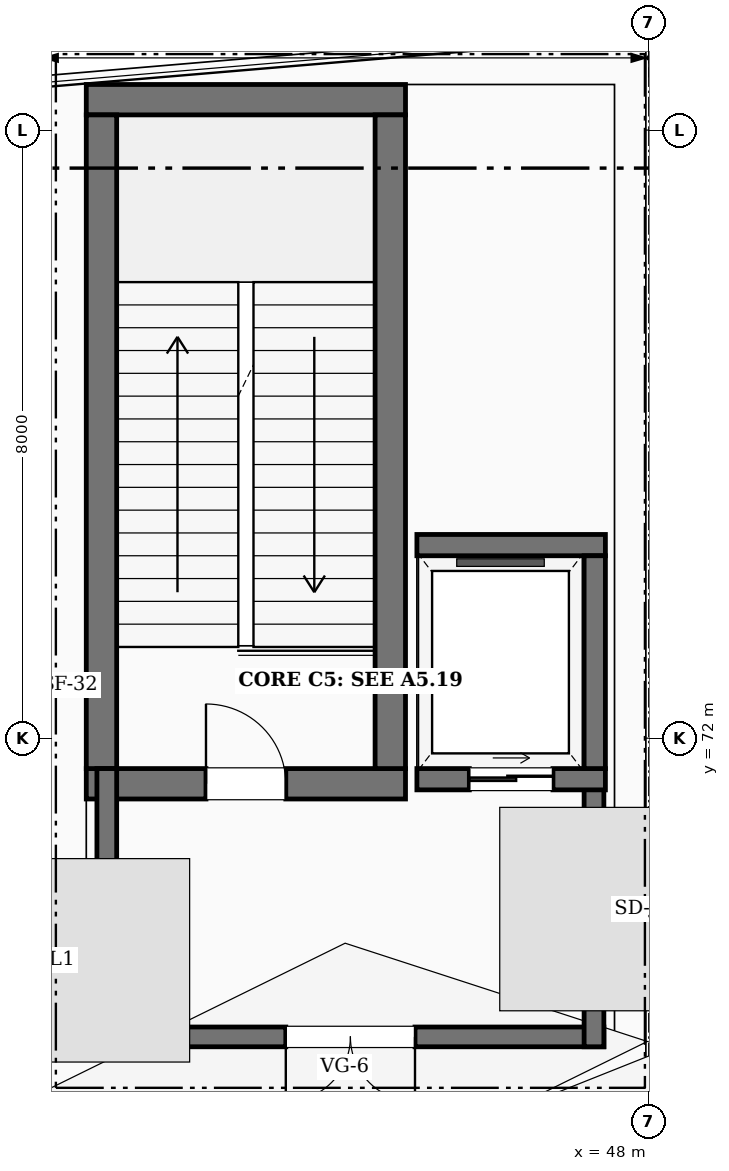
"""IFC4 building model, lengths in metres.
Left out: names, types, materials, properties, quantities, classifications, styles, units other than length and angle.
Written with IfcOpenShell. Run it as: python <this file> out.ifc"""

import sys

from ifc_helpers import new_model, si_unit, direction, frame, frame_2d, origin, place, context, subcontext, project, spatial, rectangle, extrude, element, fill, save


model = new_model("IFC4")
c1 = context("Model", 3, precision=1e-05, world=origin(), true_north=direction((0.0, 1.0)))
c2 = subcontext(c1, "Body", "Model", "MODEL_VIEW")
j1 = project(units=[si_unit("LENGTHUNIT", "METRE"), si_unit("PLANEANGLEUNIT", "RADIAN")], contexts=[c1])
p1 = place(None, origin())
s1 = spatial("IfcSite", under=j1, at=p1, CompositionType="ELEMENT")
p2 = place(p1, origin())
s2 = spatial("IfcBuilding", under=s1, at=p2, CompositionType="ELEMENT")
p3 = place(p2, frame((0.0, 0.0, 10.8)))
s3 = spatial("IfcBuildingStorey", under=s2, at=p3, CompositionType="ELEMENT", Elevation=10.8)
p4 = place(p3, frame((40.6, 71.4, 0.0), z_axis=(0.0, 0.0, 1.0), x_axis=(1.0, 0.0, 0.0)))
e1 = element("IfcWall", 1, at=p4, inside=s3, PredefinedType="SHEAR", context=c2, shape_type="SweptSolid", body=[
    extrude(rectangle(XDim=4.2, YDim=0.4, at=frame_2d((2.1, 0.0))), origin(), (0.0, 0.0, 1.0), 2.65),
])
p5 = place(p4, frame((1.575, 0.0, 0.0)))
e2 = element("IfcOpeningElement", 2, at=p5, cuts=e1, PredefinedType="OPENING", context=c2, shape_type="SweptSolid", body=[
    extrude(rectangle(XDim=1.05, YDim=2.15, at=frame_2d((0.525, 1.075))), frame((0.0, 0.21, 0.0), z_axis=(0.0, -1.0, 0.0), x_axis=(1.0, 0.0, 0.0)), (0.0, 0.0, 1.0), 0.42),
])
p6 = place(p3, frame((40.6, 80.4, 0.0), z_axis=(0.0, 0.0, 1.0), x_axis=(1.0, 0.0, 0.0)))
e3 = element("IfcWall", 3, at=p6, inside=s3, PredefinedType="SHEAR", context=c2, shape_type="SweptSolid", body=[
    extrude(rectangle(XDim=4.2, YDim=0.4, at=frame_2d((2.1, 0.0))), origin(), (0.0, 0.0, 1.0), 2.65),
])
for number, where, z_axis, x_axis in (
    (4, (40.8, 71.6, 0.0), (0.0, 0.0, 1.0), (0.0, 1.0, 0.0)),
    (5, (44.6, 71.6, 0.0), (0.0, 0.0, 1.0), (0.0, 1.0, 0.0)),
):
    element("IfcWall", number, at=place(p3, frame(where, z_axis=z_axis, x_axis=x_axis)), inside=s3, PredefinedType="SHEAR", context=c2, shape_type="SweptSolid", body=[
        extrude(rectangle(XDim=8.6, YDim=0.4, at=frame_2d((4.3, 0.0))), origin(), (0.0, 0.0, 1.0), 2.65),
    ])
p7 = place(p3, frame((47.41, 68.07, 0.0), z_axis=(0.0, 0.0, 1.0), x_axis=(-1.0, 0.0, 0.0)))
e6 = element("IfcWall", 6, at=p7, inside=s3, PredefinedType="SHEAR", context=c2, shape_type="SweptSolid", body=[
    extrude(rectangle(XDim=6.67, YDim=0.26, at=frame_2d((3.335, 0.0))), origin(), (0.0, 0.0, 1.0), 2.65),
])
p8 = place(p7, frame((2.485, 0.0, 0.0)))
e7 = element("IfcOpeningElement", 7, at=p8, cuts=e6, PredefinedType="OPENING", context=c2, shape_type="SweptSolid", body=[
    extrude(rectangle(XDim=1.7, YDim=2.2, at=frame_2d((0.85, 1.1))), frame((0.0, 0.14, 0.0), z_axis=(0.0, -1.0, 0.0), x_axis=(1.0, 0.0, 0.0)), (0.0, 0.0, 1.0), 0.28),
])
for number, where, z_axis, x_axis in (
    (8, (40.87, 67.94, 0.0), (0.0, 0.0, 1.0), (0.0, 1.0, 0.0)),
    (9, (47.28, 67.94, 0.0), (0.0, 0.0, 1.0), (0.0, 1.0, 0.0)),
):
    element("IfcWall", number, at=place(p3, frame(where, z_axis=z_axis, x_axis=x_axis)), inside=s3, PredefinedType="SHEAR", context=c2, shape_type="SweptSolid", body=[
        extrude(rectangle(XDim=3.66, YDim=0.26, at=frame_2d((1.83, 0.0))), origin(), (0.0, 0.0, 1.0), 2.65),
    ])
p9 = place(p3, frame((44.95, 71.46, 0.0), z_axis=(0.0, 0.0, 1.0), x_axis=(1.0, 0.0, 0.0)))
e10 = element("IfcWall", 10, at=p9, inside=s3, PredefinedType="SHEAR", context=c2, shape_type="SweptSolid", body=[
    extrude(rectangle(XDim=2.48, YDim=0.28, at=frame_2d((1.24, 0.0))), origin(), (0.0, 0.0, 1.0), 2.65),
])
p10 = place(p9, frame((0.69, 0.0, 0.0)))
e11 = element("IfcOpeningElement", 11, at=p10, cuts=e10, PredefinedType="OPENING", context=c2, shape_type="SweptSolid", body=[
    extrude(rectangle(XDim=1.1, YDim=2.15, at=frame_2d((0.55, 1.075))), frame((0.0, 0.15, 0.0), z_axis=(0.0, -1.0, 0.0), x_axis=(1.0, 0.0, 0.0)), (0.0, 0.0, 1.0), 0.3),
])
p11 = place(p3, frame((44.95, 74.54, 0.0), z_axis=(0.0, 0.0, 1.0), x_axis=(1.0, 0.0, 0.0)))
e12 = element("IfcWall", 12, at=p11, inside=s3, PredefinedType="SHEAR", context=c2, shape_type="SweptSolid", body=[
    extrude(rectangle(XDim=2.48, YDim=0.28, at=frame_2d((1.24, 0.0))), origin(), (0.0, 0.0, 1.0), 2.65),
])
p12 = place(p3, frame((47.29, 71.6, 0.0), z_axis=(0.0, 0.0, 1.0), x_axis=(0.0, 1.0, 0.0)))
e13 = element("IfcWall", 13, at=p12, inside=s3, PredefinedType="SHEAR", context=c2, shape_type="SweptSolid", body=[
    extrude(rectangle(XDim=2.8, YDim=0.28, at=frame_2d((1.4, 0.0))), origin(), (0.0, 0.0, 1.0), 2.65),
])
p13 = place(p5, origin())
e14 = element("IfcDoor", 14, at=p13, inside=s3, OperationType="SINGLE_SWING_LEFT", PredefinedType="DOOR", context=c2, shape_type="SweptSolid", body=[
    extrude(rectangle(XDim=1.05, YDim=2.15, at=frame_2d((0.525, 1.075))), frame((0.0, 0.025, 0.0), z_axis=(0.0, -1.0, 0.0), x_axis=(1.0, 0.0, 0.0)), (0.0, 0.0, 1.0), 0.05),
])
fill(e2, e14)
p14 = place(p8, origin())
e15 = element("IfcDoor", 15, at=p14, inside=s3, OperationType="DOUBLE_DOOR_SINGLE_SWING", PredefinedType="DOOR", context=c2, shape_type="SweptSolid", body=[
    extrude(rectangle(XDim=1.7, YDim=2.2, at=frame_2d((0.85, 1.1))), frame((0.0, 0.025, 0.0), z_axis=(0.0, -1.0, 0.0), x_axis=(1.0, 0.0, 0.0)), (0.0, 0.0, 1.0), 0.05),
])
fill(e7, e15)
p15 = place(p10, origin())
e16 = element("IfcDoor", 16, at=p15, inside=s3, OperationType="SLIDING_TO_LEFT", PredefinedType="DOOR", context=c2, shape_type="SweptSolid", body=[
    extrude(rectangle(XDim=1.1, YDim=2.15, at=frame_2d((0.55, 1.075))), frame((0.0, 0.025, 0.0), z_axis=(0.0, -1.0, 0.0), x_axis=(1.0, 0.0, 0.0)), (0.0, 0.0, 1.0), 0.05),
])
fill(e11, e16)
save(model, sys.argv[1])
